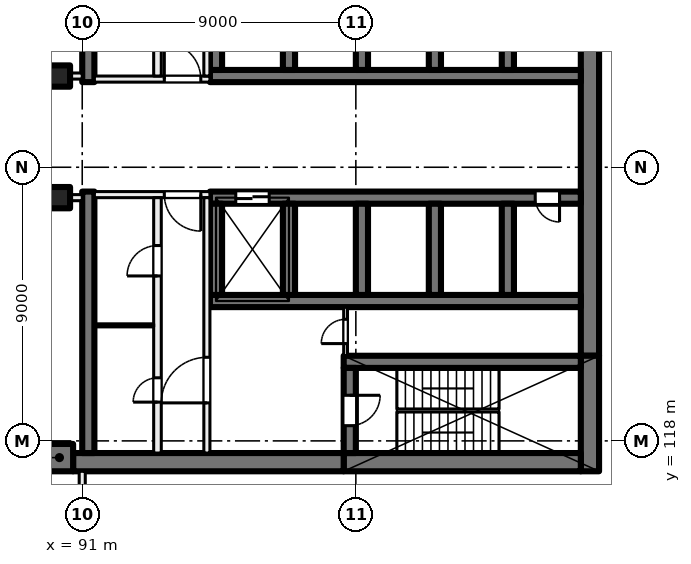
"""IFC4 building model, lengths in metres.
Left out: names, types, materials, properties, quantities, classifications, styles, units other than length and angle.
Written with IfcOpenShell. Run it as: python <this file> out.ifc"""

import sys

from ifc_helpers import new_model, si_unit, direction, frame, frame_2d, origin, origin_2d, place, context, subcontext, project, spatial, rectangle, extrude, element, fill, save


model = new_model("IFC4")
c1 = context("Model", 3, precision=1e-05, world=origin(), true_north=direction((0.0, 1.0)))
c2 = subcontext(c1, "Body", "Model", "MODEL_VIEW")
j1 = project(units=[si_unit("LENGTHUNIT", "METRE"), si_unit("PLANEANGLEUNIT", "RADIAN")], contexts=[c1])
p1 = place(None, origin())
s1 = spatial("IfcSite", under=j1, at=p1, CompositionType="ELEMENT")
p2 = place(p1, origin())
s2 = spatial("IfcBuilding", under=s1, at=p2, CompositionType="ELEMENT")
p3 = place(p2, frame((0.0, 0.0, -4.5)))
s3 = spatial("IfcBuildingStorey", under=s2, at=p3, CompositionType="ELEMENT", Elevation=-4.5)
for number, where, z_axis, x_axis in (
    (1, (90.25, 130.0, 0.0), (0.0, 0.0, 1.0), (1.0, 0.0, 0.0)),
    (2, (90.25, 126.0, 0.0), (0.0, 0.0, 1.0), (1.0, 0.0, 0.0)),
):
    element("IfcColumn", number, at=place(p3, frame(where, z_axis=z_axis, x_axis=x_axis)), inside=s3, PredefinedType="COLUMN", context=c2, shape_type="SweptSolid", body=[
        extrude(rectangle(XDim=0.7, YDim=0.7, at=origin_2d()), origin(), (0.0, 0.0, 1.0), 4.5),
    ])
p4 = place(p3, frame((90.25, 117.45, 0.0), z_axis=(0.0, 0.0, 1.0), x_axis=(1.0, 0.0, 0.0)))
e3 = element("IfcColumn", 3, at=p4, inside=s3, PredefinedType="COLUMN", context=c2, shape_type="SweptSolid", body=[
    extrude(rectangle(XDim=0.9, YDim=0.9, at=origin_2d()), origin(), (0.0, 0.0, 1.0), 4.5),
])
p5 = place(p3, frame((107.7, 135.2, 0.0), z_axis=(0.0, 0.0, 1.0), x_axis=(0.0, -1.0, 0.0)))
e4 = element("IfcWall", 4, at=p5, inside=s3, PredefinedType="SHEAR", context=c2, shape_type="SweptSolid", body=[
    extrude(rectangle(XDim=14.4, YDim=0.6, at=frame_2d((7.2, 0.0))), origin(), (0.0, 0.0, 1.0), 4.5),
])
p6 = place(p3, frame((107.7, 120.8, 0.0), z_axis=(0.0, 0.0, 1.0), x_axis=(0.0, -1.0, 0.0)))
e5 = element("IfcWall", 5, at=p6, inside=s3, PredefinedType="SHEAR", context=c2, shape_type="SweptSolid", body=[
    extrude(rectangle(XDim=3.8, YDim=0.6, at=frame_2d((1.9, 0.0))), origin(), (0.0, 0.0, 1.0), 4.5),
])
p7 = place(p3, frame((107.4, 117.3, 0.0), z_axis=(0.0, 0.0, 1.0), x_axis=(-1.0, 0.0, 0.0)))
e6 = element("IfcWall", 6, at=p7, inside=s3, PredefinedType="SHEAR", context=c2, shape_type="SweptSolid", body=[
    extrude(rectangle(XDim=7.8, YDim=0.6, at=frame_2d((3.9, 0.0))), origin(), (0.0, 0.0, 1.0), 4.5),
])
p8 = place(p3, frame((99.6, 117.3, 0.0), z_axis=(0.0, 0.0, 1.0), x_axis=(-1.0, 0.0, 0.0)))
e7 = element("IfcWall", 7, at=p8, inside=s3, PredefinedType="SHEAR", context=c2, shape_type="SweptSolid", body=[
    extrude(rectangle(XDim=8.9, YDim=0.6, at=frame_2d((4.45, 0.0))), origin(), (0.0, 0.0, 1.0), 4.5),
])
p9 = place(p3, frame((107.4, 120.6, 0.0), z_axis=(0.0, 0.0, 1.0), x_axis=(-1.0, 0.0, 0.0)))
e8 = element("IfcWall", 8, at=p9, inside=s3, PredefinedType="SHEAR", context=c2, shape_type="SweptSolid", body=[
    extrude(rectangle(XDim=7.8, YDim=0.4, at=frame_2d((3.9, 0.0))), origin(), (0.0, 0.0, 1.0), 4.5),
])
p10 = place(p3, frame((99.8, 120.4, 0.0), z_axis=(0.0, 0.0, 1.0), x_axis=(0.0, -1.0, 0.0)))
e9 = element("IfcWall", 9, at=p10, inside=s3, PredefinedType="SHEAR", context=c2, shape_type="SweptSolid", body=[
    extrude(rectangle(XDim=2.8, YDim=0.4, at=frame_2d((1.4, 0.0))), origin(), (0.0, 0.0, 1.0), 4.5),
])
p11 = place(p10, frame((0.9, 0.0, 0.0)))
e10 = element("IfcOpeningElement", 10, at=p11, cuts=e9, PredefinedType="OPENING", context=c2, shape_type="SweptSolid", body=[
    extrude(rectangle(XDim=1.0, YDim=2.1, at=frame_2d((0.5, 1.05))), frame((0.0, 0.21, 0.0), z_axis=(0.0, -1.0, 0.0), x_axis=(1.0, 0.0, 0.0)), (0.0, 0.0, 1.0), 0.42),
])
p12 = place(p3, frame((107.4, 130.0, 0.0), z_axis=(0.0, 0.0, 1.0), x_axis=(-1.0, 0.0, 0.0)))
e11 = element("IfcWall", 11, at=p12, inside=s3, PredefinedType="SHEAR", context=c2, shape_type="SweptSolid", body=[
    extrude(rectangle(XDim=12.2, YDim=0.4, at=frame_2d((6.1, 0.0))), origin(), (0.0, 0.0, 1.0), 4.5),
])
for number, where, z_axis, x_axis in (
    (12, (105.0, 133.2, 0.0), (0.0, 0.0, 1.0), (0.0, -1.0, 0.0)),
    (13, (102.6, 133.2, 0.0), (0.0, 0.0, 1.0), (0.0, -1.0, 0.0)),
    (14, (100.2, 133.2, 0.0), (0.0, 0.0, 1.0), (0.0, -1.0, 0.0)),
    (15, (97.8, 133.2, 0.0), (0.0, 0.0, 1.0), (0.0, -1.0, 0.0)),
    (16, (95.4, 133.2, 0.0), (0.0, 0.0, 1.0), (0.0, -1.0, 0.0)),
):
    element("IfcWall", number, at=place(p3, frame(where, z_axis=z_axis, x_axis=x_axis)), inside=s3, PredefinedType="SHEAR", context=c2, shape_type="SweptSolid", body=[
        extrude(rectangle(XDim=3.0, YDim=0.4, at=frame_2d((1.5, 0.0))), origin(), (0.0, 0.0, 1.0), 4.5),
    ])
p13 = place(p3, frame((107.4, 126.0, 0.0), z_axis=(0.0, 0.0, 1.0), x_axis=(-1.0, 0.0, 0.0)))
e17 = element("IfcWall", 17, at=p13, inside=s3, PredefinedType="SHEAR", context=c2, shape_type="SweptSolid", body=[
    extrude(rectangle(XDim=12.2, YDim=0.4, at=frame_2d((6.1, 0.0))), origin(), (0.0, 0.0, 1.0), 4.5),
])
p14 = place(p13, frame((10.25, 0.0, 0.0)))
e18 = element("IfcOpeningElement", 18, at=p14, cuts=e17, PredefinedType="OPENING", context=c2, shape_type="SweptSolid", body=[
    extrude(rectangle(XDim=1.1, YDim=2.1, at=frame_2d((0.55, 1.05))), frame((0.0, 0.21, 0.0), z_axis=(0.0, -1.0, 0.0), x_axis=(1.0, 0.0, 0.0)), (0.0, 0.0, 1.0), 0.42),
])
p15 = place(p13, frame((0.7, 0.0, 0.0)))
e19 = element("IfcOpeningElement", 19, at=p15, cuts=e17, PredefinedType="OPENING", context=c2, shape_type="SweptSolid", body=[
    extrude(rectangle(XDim=0.8, YDim=2.1, at=frame_2d((0.4, 1.05))), frame((0.0, 0.21, 0.0), z_axis=(0.0, -1.0, 0.0), x_axis=(1.0, 0.0, 0.0)), (0.0, 0.0, 1.0), 0.42),
])
p16 = place(p3, frame((107.4, 122.6, 0.0), z_axis=(0.0, 0.0, 1.0), x_axis=(-1.0, 0.0, 0.0)))
e20 = element("IfcWall", 20, at=p16, inside=s3, PredefinedType="SHEAR", context=c2, shape_type="SweptSolid", body=[
    extrude(rectangle(XDim=12.2, YDim=0.4, at=frame_2d((6.1, 0.0))), origin(), (0.0, 0.0, 1.0), 4.5),
])
for number, where, z_axis, x_axis in (
    (21, (105.0, 125.8, 0.0), (0.0, 0.0, 1.0), (0.0, -1.0, 0.0)),
    (22, (102.6, 125.8, 0.0), (0.0, 0.0, 1.0), (0.0, -1.0, 0.0)),
    (23, (100.2, 125.8, 0.0), (0.0, 0.0, 1.0), (0.0, -1.0, 0.0)),
    (24, (97.8, 125.8, 0.0), (0.0, 0.0, 1.0), (0.0, -1.0, 0.0)),
    (25, (95.4, 125.8, 0.0), (0.0, 0.0, 1.0), (0.0, -1.0, 0.0)),
):
    element("IfcWall", number, at=place(p3, frame(where, z_axis=z_axis, x_axis=x_axis)), inside=s3, PredefinedType="SHEAR", context=c2, shape_type="SweptSolid", body=[
        extrude(rectangle(XDim=3.0, YDim=0.4, at=frame_2d((1.5, 0.0))), origin(), (0.0, 0.0, 1.0), 4.5),
    ])
for number, where, z_axis, x_axis in (
    (26, (91.2, 138.4, 0.0), (0.0, 0.0, 1.0), (0.0, -1.0, 0.0)),
    (27, (91.2, 126.2, 0.0), (0.0, 0.0, 1.0), (0.0, -1.0, 0.0)),
):
    element("IfcWall", number, at=place(p3, frame(where, z_axis=z_axis, x_axis=x_axis)), inside=s3, PredefinedType="SHEAR", context=c2, shape_type="SweptSolid", body=[
        extrude(rectangle(XDim=8.6, YDim=0.4, at=frame_2d((4.3, 0.0))), origin(), (0.0, 0.0, 1.0), 4.5),
    ])
p17 = place(p3, frame((95.2, 126.1, 0.0), z_axis=(0.0, 0.0, 1.0), x_axis=(-1.0, 0.0, 0.0)))
e28 = element("IfcWall", 28, at=p17, inside=s3, PredefinedType="PARTITIONING", context=c2, shape_type="SweptSolid", body=[
    extrude(rectangle(XDim=3.8, YDim=0.2, at=frame_2d((1.9, 0.0))), origin(), (0.0, 0.0, 1.0), 4.1),
])
p18 = place(p17, frame((0.3, 0.0, 0.0)))
e29 = element("IfcOpeningElement", 29, at=p18, cuts=e28, PredefinedType="OPENING", context=c2, shape_type="SweptSolid", body=[
    extrude(rectangle(XDim=1.2, YDim=2.1, at=frame_2d((0.6, 1.05))), frame((0.0, 0.11, 0.0), z_axis=(0.0, -1.0, 0.0), x_axis=(1.0, 0.0, 0.0)), (0.0, 0.0, 1.0), 0.22),
])
p19 = place(p3, frame((95.1, 117.6, 0.0), z_axis=(0.0, 0.0, 1.0), x_axis=(0.0, 1.0, 0.0)))
e30 = element("IfcWall", 30, at=p19, inside=s3, PredefinedType="PARTITIONING", context=c2, shape_type="SweptSolid", body=[
    extrude(rectangle(XDim=8.4, YDim=0.2, at=frame_2d((4.2, 0.0))), origin(), (0.0, 0.0, 1.0), 4.1),
])
p20 = place(p19, frame((1.65, 0.0, 0.0)))
e31 = element("IfcOpeningElement", 31, at=p20, cuts=e30, PredefinedType="OPENING", context=c2, shape_type="SweptSolid", body=[
    extrude(rectangle(XDim=1.5, YDim=2.1, at=frame_2d((0.75, 1.05))), frame((0.0, 0.11, 0.0), z_axis=(0.0, -1.0, 0.0), x_axis=(1.0, 0.0, 0.0)), (0.0, 0.0, 1.0), 0.22),
])
p21 = place(p3, frame((93.475, 117.6, 0.0), z_axis=(0.0, 0.0, 1.0), x_axis=(0.0, 1.0, 0.0)))
e32 = element("IfcWall", 32, at=p21, inside=s3, PredefinedType="PARTITIONING", context=c2, shape_type="SweptSolid", body=[
    extrude(rectangle(XDim=8.4, YDim=0.25, at=frame_2d((4.2, 0.0))), origin(), (0.0, 0.0, 1.0), 4.1),
])
p22 = place(p21, frame((5.825, 0.0, 0.0)))
e33 = element("IfcOpeningElement", 33, at=p22, cuts=e32, PredefinedType="OPENING", context=c2, shape_type="SweptSolid", body=[
    extrude(rectangle(XDim=1.0, YDim=2.1, at=frame_2d((0.5, 1.05))), frame((0.0, 0.135, 0.0), z_axis=(0.0, -1.0, 0.0), x_axis=(1.0, 0.0, 0.0)), (0.0, 0.0, 1.0), 0.27),
])
p23 = place(p21, frame((1.675, 0.0, 0.0)))
e34 = element("IfcOpeningElement", 34, at=p23, cuts=e32, PredefinedType="OPENING", context=c2, shape_type="SweptSolid", body=[
    extrude(rectangle(XDim=0.8, YDim=2.1, at=frame_2d((0.4, 1.05))), frame((0.0, 0.135, 0.0), z_axis=(0.0, -1.0, 0.0), x_axis=(1.0, 0.0, 0.0)), (0.0, 0.0, 1.0), 0.27),
])
p24 = place(p3, frame((99.663, 120.8, 0.0), z_axis=(0.0, 0.0, 1.0), x_axis=(0.0, 1.0, 0.0)))
e35 = element("IfcWall", 35, at=p24, inside=s3, PredefinedType="PARTITIONING", context=c2, shape_type="SweptSolid", body=[
    extrude(rectangle(XDim=1.6, YDim=0.125, at=frame_2d((0.8, 0.0))), origin(), (0.0, 0.0, 1.0), 4.1),
])
p25 = place(p24, frame((0.4, 0.0, 0.0)))
e36 = element("IfcOpeningElement", 36, at=p25, cuts=e35, PredefinedType="OPENING", context=c2, shape_type="SweptSolid", body=[
    extrude(rectangle(XDim=0.8, YDim=2.1, at=frame_2d((0.4, 1.05))), frame((0.0, 0.073, 0.0), z_axis=(0.0, -1.0, 0.0), x_axis=(1.0, 0.0, 0.0)), (0.0, 0.0, 1.0), 0.145),
])
p26 = place(p3, frame((93.35, 121.8, 0.0), z_axis=(0.0, 0.0, 1.0), x_axis=(-1.0, 0.0, 0.0)))
e37 = element("IfcWall", 37, at=p26, inside=s3, PredefinedType="PARTITIONING", context=c2, shape_type="SweptSolid", body=[
    extrude(rectangle(XDim=1.95, YDim=0.1, at=frame_2d((0.975, 0.0))), origin(), (0.0, 0.0, 1.0), 4.1),
])
p27 = place(p3, frame((91.4, 129.9, 0.0), z_axis=(0.0, 0.0, 1.0), x_axis=(1.0, 0.0, 0.0)))
e38 = element("IfcWall", 38, at=p27, inside=s3, PredefinedType="PARTITIONING", context=c2, shape_type="SweptSolid", body=[
    extrude(rectangle(XDim=3.8, YDim=0.2, at=frame_2d((1.9, 0.0))), origin(), (0.0, 0.0, 1.0), 4.1),
])
p28 = place(p27, frame((2.3, 0.0, 0.0)))
e39 = element("IfcOpeningElement", 39, at=p28, cuts=e38, PredefinedType="OPENING", context=c2, shape_type="SweptSolid", body=[
    extrude(rectangle(XDim=1.2, YDim=2.1, at=frame_2d((0.6, 1.05))), frame((0.0, 0.11, 0.0), z_axis=(0.0, -1.0, 0.0), x_axis=(1.0, 0.0, 0.0)), (0.0, 0.0, 1.0), 0.22),
])
p29 = place(p3, frame((95.1, 130.0, 0.0), z_axis=(0.0, 0.0, 1.0), x_axis=(0.0, 1.0, 0.0)))
e40 = element("IfcWall", 40, at=p29, inside=s3, PredefinedType="PARTITIONING", context=c2, shape_type="SweptSolid", body=[
    extrude(rectangle(XDim=8.4, YDim=0.2, at=frame_2d((4.2, 0.0))), origin(), (0.0, 0.0, 1.0), 4.1),
])
p30 = place(p29, frame((5.25, 0.0, 0.0)))
e41 = element("IfcOpeningElement", 41, at=p30, cuts=e40, PredefinedType="OPENING", context=c2, shape_type="SweptSolid", body=[
    extrude(rectangle(XDim=1.5, YDim=2.1, at=frame_2d((0.75, 1.05))), frame((0.0, 0.11, 0.0), z_axis=(0.0, -1.0, 0.0), x_axis=(1.0, 0.0, 0.0)), (0.0, 0.0, 1.0), 0.22),
])
p31 = place(p3, frame((93.475, 130.0, 0.0), z_axis=(0.0, 0.0, 1.0), x_axis=(0.0, 1.0, 0.0)))
e42 = element("IfcWall", 42, at=p31, inside=s3, PredefinedType="PARTITIONING", context=c2, shape_type="SweptSolid", body=[
    extrude(rectangle(XDim=8.4, YDim=0.25, at=frame_2d((4.2, 0.0))), origin(), (0.0, 0.0, 1.0), 4.1),
])
p32 = place(p31, frame((2.375, 0.0, 0.0)))
e43 = element("IfcOpeningElement", 43, at=p32, cuts=e42, PredefinedType="OPENING", context=c2, shape_type="SweptSolid", body=[
    extrude(rectangle(XDim=0.8, YDim=2.1, at=frame_2d((0.4, 1.05))), frame((0.0, 0.135, 0.0), z_axis=(0.0, -1.0, 0.0), x_axis=(1.0, 0.0, 0.0)), (0.0, 0.0, 1.0), 0.27),
])
p33 = place(p31, frame((6.525, 0.0, 0.0)))
e44 = element("IfcOpeningElement", 44, at=p33, cuts=e42, PredefinedType="OPENING", context=c2, shape_type="SweptSolid", body=[
    extrude(rectangle(XDim=1.0, YDim=2.1, at=frame_2d((0.5, 1.05))), frame((0.0, 0.135, 0.0), z_axis=(0.0, -1.0, 0.0), x_axis=(1.0, 0.0, 0.0)), (0.0, 0.0, 1.0), 0.27),
])
p34 = place(p3, frame((91.0, 126.0, 0.0), z_axis=(0.0, 0.0, 1.0), x_axis=(-1.0, 0.0, 0.0)))
e45 = element("IfcWall", 45, at=p34, inside=s3, PredefinedType="PARTITIONING", context=c2, shape_type="SweptSolid", body=[
    extrude(rectangle(XDim=45.0, YDim=0.2, at=frame_2d((22.5, 0.0))), origin(), (0.0, 0.0, 1.0), 4.1),
])
p35 = place(p34, frame((35.4, 0.0, 0.0)))
e46 = element("IfcOpeningElement", 46, at=p35, cuts=e45, PredefinedType="OPENING", context=c2, shape_type="SweptSolid", body=[
    extrude(rectangle(XDim=1.0, YDim=2.1, at=frame_2d((0.5, 1.05))), frame((0.0, 0.11, 0.0), z_axis=(0.0, -1.0, 0.0), x_axis=(1.0, 0.0, 0.0)), (0.0, 0.0, 1.0), 0.22),
])
p36 = place(p34, frame((22.0, 0.0, 0.0)))
e47 = element("IfcOpeningElement", 47, at=p36, cuts=e45, PredefinedType="OPENING", context=c2, shape_type="SweptSolid", body=[
    extrude(rectangle(XDim=1.0, YDim=2.1, at=frame_2d((0.5, 1.05))), frame((0.0, 0.11, 0.0), z_axis=(0.0, -1.0, 0.0), x_axis=(1.0, 0.0, 0.0)), (0.0, 0.0, 1.0), 0.22),
])
p37 = place(p34, frame((8.302, 0.0, 0.0)))
e48 = element("IfcOpeningElement", 48, at=p37, cuts=e45, PredefinedType="OPENING", context=c2, shape_type="SweptSolid", body=[
    extrude(rectangle(XDim=1.0, YDim=2.1, at=frame_2d((0.5, 1.05))), frame((0.0, 0.11, 0.0), z_axis=(0.0, -1.0, 0.0), x_axis=(1.0, 0.0, 0.0)), (0.0, 0.0, 1.0), 0.22),
])
p38 = place(p3, frame((73.0, 130.0, 0.0), z_axis=(0.0, 0.0, 1.0), x_axis=(1.0, 0.0, 0.0)))
e49 = element("IfcWall", 49, at=p38, inside=s3, PredefinedType="PARTITIONING", context=c2, shape_type="SweptSolid", body=[
    extrude(rectangle(XDim=18.0, YDim=0.2, at=frame_2d((9.0, 0.0))), origin(), (0.0, 0.0, 1.0), 4.1),
])
p39 = place(p38, frame((8.698, 0.0, 0.0)))
e50 = element("IfcOpeningElement", 50, at=p39, cuts=e49, PredefinedType="OPENING", context=c2, shape_type="SweptSolid", body=[
    extrude(rectangle(XDim=1.0, YDim=2.1, at=frame_2d((0.5, 1.05))), frame((0.0, 0.11, 0.0), z_axis=(0.0, -1.0, 0.0), x_axis=(1.0, 0.0, 0.0)), (0.0, 0.0, 1.0), 0.22),
])
p40 = place(p3, frame((91.0, 109.1, 0.0), z_axis=(0.0, 0.0, 1.0), x_axis=(0.0, 1.0, 0.0)))
e51 = element("IfcWall", 51, at=p40, inside=s3, PredefinedType="PARTITIONING", context=c2, shape_type="SweptSolid", body=[
    extrude(rectangle(XDim=7.9, YDim=0.2, at=frame_2d((3.95, 0.0))), origin(), (0.0, 0.0, 1.0), 4.1),
])
p41 = place(p14, origin())
e52 = element("IfcDoor", 52, at=p41, inside=s3, OperationType="DOUBLE_DOOR_SLIDING", PredefinedType="DOOR", context=c2, shape_type="SweptSolid", body=[
    extrude(rectangle(XDim=1.1, YDim=2.1, at=frame_2d((0.55, 1.05))), frame((0.0, 0.025, 0.0), z_axis=(0.0, -1.0, 0.0), x_axis=(1.0, 0.0, 0.0)), (0.0, 0.0, 1.0), 0.05),
])
fill(e18, e52)
p42 = place(p15, origin())
e53 = element("IfcDoor", 53, at=p42, inside=s3, OperationType="SINGLE_SWING_LEFT", PredefinedType="DOOR", context=c2, shape_type="SweptSolid", body=[
    extrude(rectangle(XDim=0.8, YDim=2.1, at=frame_2d((0.4, 1.05))), frame((0.0, 0.025, 0.0), z_axis=(0.0, -1.0, 0.0), x_axis=(1.0, 0.0, 0.0)), (0.0, 0.0, 1.0), 0.05),
])
fill(e19, e53)
p43 = place(p18, origin())
e54 = element("IfcDoor", 54, at=p43, inside=s3, OperationType="DOUBLE_DOOR_SINGLE_SWING", PredefinedType="DOOR", context=c2, shape_type="SweptSolid", body=[
    extrude(rectangle(XDim=1.2, YDim=2.1, at=frame_2d((0.6, 1.05))), frame((0.0, 0.025, 0.0), z_axis=(0.0, -1.0, 0.0), x_axis=(1.0, 0.0, 0.0)), (0.0, 0.0, 1.0), 0.05),
])
fill(e29, e54)
p44 = place(p20, origin())
e55 = element("IfcDoor", 55, at=p44, inside=s3, OperationType="DOUBLE_DOOR_SINGLE_SWING", PredefinedType="DOOR", context=c2, shape_type="SweptSolid", body=[
    extrude(rectangle(XDim=1.5, YDim=2.1, at=frame_2d((0.75, 1.05))), frame((0.0, 0.025, 0.0), z_axis=(0.0, -1.0, 0.0), x_axis=(1.0, 0.0, 0.0)), (0.0, 0.0, 1.0), 0.05),
])
fill(e31, e55)
p45 = place(p11, origin())
e56 = element("IfcDoor", 56, at=p45, inside=s3, OperationType="SINGLE_SWING_LEFT", PredefinedType="DOOR", context=c2, shape_type="SweptSolid", body=[
    extrude(rectangle(XDim=1.0, YDim=2.1, at=frame_2d((0.5, 1.05))), frame((0.0, 0.025, 0.0), z_axis=(0.0, -1.0, 0.0), x_axis=(1.0, 0.0, 0.0)), (0.0, 0.0, 1.0), 0.05),
])
fill(e10, e56)
p46 = place(p25, origin())
e57 = element("IfcDoor", 57, at=p46, inside=s3, OperationType="SINGLE_SWING_RIGHT", PredefinedType="DOOR", context=c2, shape_type="SweptSolid", body=[
    extrude(rectangle(XDim=0.8, YDim=2.1, at=frame_2d((0.4, 1.05))), frame((0.0, 0.025, 0.0), z_axis=(0.0, -1.0, 0.0), x_axis=(1.0, 0.0, 0.0)), (0.0, 0.0, 1.0), 0.05),
])
fill(e36, e57)
p47 = place(p22, origin())
e58 = element("IfcDoor", 58, at=p47, inside=s3, OperationType="SINGLE_SWING_LEFT", PredefinedType="DOOR", context=c2, shape_type="SweptSolid", body=[
    extrude(rectangle(XDim=1.0, YDim=2.1, at=frame_2d((0.5, 1.05))), frame((0.0, 0.025, 0.0), z_axis=(0.0, -1.0, 0.0), x_axis=(1.0, 0.0, 0.0)), (0.0, 0.0, 1.0), 0.05),
])
fill(e33, e58)
p48 = place(p23, origin())
e59 = element("IfcDoor", 59, at=p48, inside=s3, OperationType="SINGLE_SWING_RIGHT", PredefinedType="DOOR", context=c2, shape_type="SweptSolid", body=[
    extrude(rectangle(XDim=0.8, YDim=2.1, at=frame_2d((0.4, 1.05))), frame((0.0, 0.025, 0.0), z_axis=(0.0, -1.0, 0.0), x_axis=(1.0, 0.0, 0.0)), (0.0, 0.0, 1.0), 0.05),
])
fill(e34, e59)
p49 = place(p28, origin())
e60 = element("IfcDoor", 60, at=p49, inside=s3, OperationType="DOUBLE_DOOR_SINGLE_SWING", PredefinedType="DOOR", context=c2, shape_type="SweptSolid", body=[
    extrude(rectangle(XDim=1.2, YDim=2.1, at=frame_2d((0.6, 1.05))), frame((0.0, 0.025, 0.0), z_axis=(0.0, -1.0, 0.0), x_axis=(1.0, 0.0, 0.0)), (0.0, 0.0, 1.0), 0.05),
])
fill(e39, e60)
save(model, sys.argv[1])
